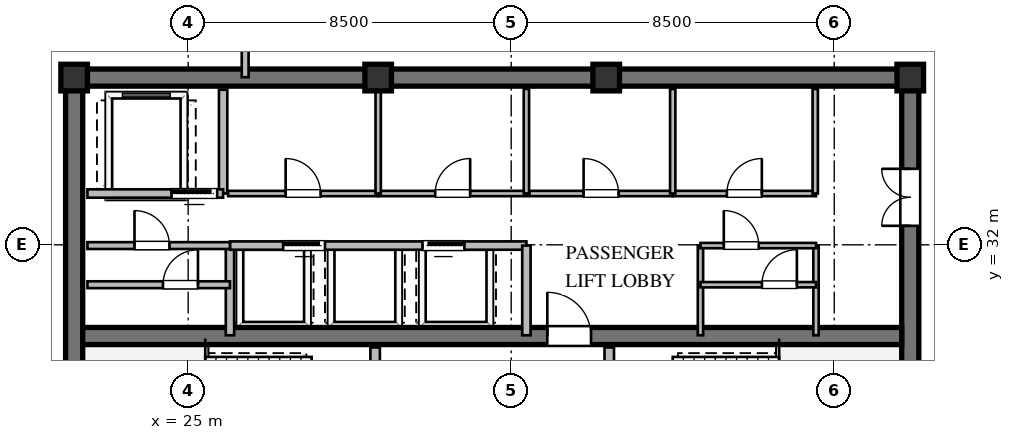
"""IFC4 building model, lengths in metres.
Left out: names, types, materials, properties, quantities, classifications, styles, units other than length and angle.
Written with IfcOpenShell. Run it as: python <this file> out.ifc"""

import sys

from ifc_helpers import new_model, si_unit, direction, frame, frame_2d, origin, origin_2d, place, context, subcontext, project, spatial, rectangle, extrude, element, fill, save


model = new_model("IFC4")
c1 = context("Model", 3, precision=1e-05, world=origin(), true_north=direction((0.0, 1.0)))
c2 = subcontext(c1, "Body", "Model", "MODEL_VIEW")
j1 = project(units=[si_unit("LENGTHUNIT", "METRE"), si_unit("PLANEANGLEUNIT", "RADIAN")], contexts=[c1])
p1 = place(None, origin())
s1 = spatial("IfcSite", under=j1, at=p1, CompositionType="ELEMENT")
p2 = place(p1, origin())
s2 = spatial("IfcBuilding", under=s1, at=p2, CompositionType="ELEMENT")
p3 = place(p2, frame((0.0, 0.0, 289.0)))
s3 = spatial("IfcBuildingStorey", under=s2, at=p3, CompositionType="ELEMENT", Elevation=289.0)
p4 = place(p3, frame((21.775, 36.4, 0.0), z_axis=(0.0, 0.0, 1.0), x_axis=(1.0, 0.0, 0.0)))
e1 = element("IfcWall", 1, at=p4, inside=s3, PredefinedType="SHEAR", context=c2, shape_type="SweptSolid", body=[
    extrude(rectangle(XDim=22.45, YDim=0.45, at=frame_2d((11.225, 0.0))), origin(), (0.0, 0.0, 1.0), 3.48),
])
p5 = place(p3, frame((22.0, 23.825, 0.0), z_axis=(0.0, 0.0, 1.0), x_axis=(0.0, 1.0, 0.0)))
e2 = element("IfcWall", 2, at=p5, inside=s3, PredefinedType="SHEAR", context=c2, shape_type="SweptSolid", body=[
    extrude(rectangle(XDim=12.35, YDim=0.45, at=frame_2d((6.175, 0.0))), origin(), (0.0, 0.0, 1.0), 3.48),
])
p6 = place(p3, frame((44.0, 23.825, 0.0), z_axis=(0.0, 0.0, 1.0), x_axis=(0.0, 1.0, 0.0)))
e3 = element("IfcWall", 3, at=p6, inside=s3, PredefinedType="SHEAR", context=c2, shape_type="SweptSolid", body=[
    extrude(rectangle(XDim=12.35, YDim=0.45, at=frame_2d((6.175, 0.0))), origin(), (0.0, 0.0, 1.0), 3.48),
])
p7 = place(p6, frame((8.675, 0.0, 0.0)))
e4 = element("IfcOpeningElement", 4, at=p7, cuts=e3, PredefinedType="OPENING", context=c2, shape_type="SweptSolid", body=[
    extrude(rectangle(XDim=1.5, YDim=2.15, at=frame_2d((0.75, 1.075))), frame((0.0, 0.235, 0.0), z_axis=(0.0, -1.0, 0.0), x_axis=(1.0, 0.0, 0.0)), (0.0, 0.0, 1.0), 0.47),
])
p8 = place(p3, frame((22.225, 29.6, 0.0), z_axis=(0.0, 0.0, 1.0), x_axis=(1.0, 0.0, 0.0)))
e5 = element("IfcWall", 5, at=p8, inside=s3, PredefinedType="SHEAR", context=c2, shape_type="SweptSolid", body=[
    extrude(rectangle(XDim=21.55, YDim=0.45, at=frame_2d((10.775, 0.0))), origin(), (0.0, 0.0, 1.0), 3.48),
])
p9 = place(p8, frame((12.225, 0.0, 0.0)))
e6 = element("IfcOpeningElement", 6, at=p9, cuts=e5, PredefinedType="OPENING", context=c2, shape_type="SweptSolid", body=[
    extrude(rectangle(XDim=1.15, YDim=2.1, at=frame_2d((0.575, 1.05))), frame((0.0, 0.235, 0.0), z_axis=(0.0, -1.0, 0.0), x_axis=(1.0, 0.0, 0.0)), (0.0, 0.0, 1.0), 0.47),
])
for number, where, z_axis, x_axis in (
    (7, (44.0, 36.4, 0.0), (0.0, 0.0, 1.0), (1.0, 0.0, 0.0)),
    (8, (36.0, 36.4, 0.0), (0.0, 0.0, 1.0), (1.0, 0.0, 0.0)),
    (9, (30.0, 36.4, 0.0), (0.0, 0.0, 1.0), (1.0, 0.0, 0.0)),
    (10, (22.0, 36.4, 0.0), (0.0, 0.0, 1.0), (1.0, 0.0, 0.0)),
):
    element("IfcColumn", number, at=place(p3, frame(where, z_axis=z_axis, x_axis=x_axis)), inside=s3, PredefinedType="COLUMN", context=c2, shape_type="SweptSolid", body=[
        extrude(rectangle(XDim=0.7, YDim=0.7, at=origin_2d()), origin(), (0.0, 0.0, 1.0), 3.8),
    ])
p10 = place(p3, frame((29.92, 23.9, 0.0), z_axis=(0.0, 0.0, 1.0), x_axis=(0.0, 1.0, 0.0)))
e11 = element("IfcWall", 11, at=p10, inside=s3, PredefinedType="SOLIDWALL", context=c2, shape_type="SweptSolid", body=[
    extrude(rectangle(XDim=5.4, YDim=0.25, at=frame_2d((2.7, 0.0))), origin(), (0.0, 0.0, 1.0), 2.47),
])
p11 = place(p10, frame((3.421, 0.0, 0.0)))
e12 = element("IfcOpeningElement", 12, at=p11, cuts=e11, PredefinedType="OPENING", context=c2, shape_type="SweptSolid", body=[
    extrude(rectangle(XDim=1.15, YDim=2.1, at=frame_2d((0.575, 1.05))), frame((0.0, 0.135, 0.0), z_axis=(0.0, -1.0, 0.0), x_axis=(1.0, 0.0, 0.0)), (0.0, 0.0, 1.0), 0.27),
])
p12 = place(p3, frame((36.08, 23.9, 0.0), z_axis=(0.0, 0.0, 1.0), x_axis=(0.0, 1.0, 0.0)))
e13 = element("IfcWall", 13, at=p12, inside=s3, PredefinedType="SOLIDWALL", context=c2, shape_type="SweptSolid", body=[
    extrude(rectangle(XDim=5.4, YDim=0.25, at=frame_2d((2.7, 0.0))), origin(), (0.0, 0.0, 1.0), 3.48),
])
p13 = place(p12, frame((3.421, 0.0, 0.0)))
e14 = element("IfcOpeningElement", 14, at=p13, cuts=e13, PredefinedType="OPENING", context=c2, shape_type="SweptSolid", body=[
    extrude(rectangle(XDim=1.15, YDim=2.1, at=frame_2d((0.575, 1.05))), frame((0.0, 0.135, 0.0), z_axis=(0.0, -1.0, 0.0), x_axis=(1.0, 0.0, 0.0)), (0.0, 0.0, 1.0), 0.27),
])
p14 = place(p3, frame((25.92, 33.35, 0.0), z_axis=(0.0, 0.0, 1.0), x_axis=(0.0, 1.0, 0.0)))
e15 = element("IfcWall", 15, at=p14, inside=s3, PredefinedType="SOLIDWALL", context=c2, shape_type="SweptSolid", body=[
    extrude(rectangle(XDim=2.73, YDim=0.22, at=frame_2d((1.365, 0.0))), origin(), (0.0, 0.0, 1.0), 3.48),
])
p15 = place(p3, frame((22.35, 33.35, 0.0), z_axis=(0.0, 0.0, 1.0), x_axis=(1.0, 0.0, 0.0)))
e16 = element("IfcWall", 16, at=p15, inside=s3, PredefinedType="SOLIDWALL", context=c2, shape_type="SweptSolid", body=[
    extrude(rectangle(XDim=3.57, YDim=0.22, at=frame_2d((1.785, 0.0))), origin(), (0.0, 0.0, 1.0), 3.48),
])
p16 = place(p15, frame((2.213, 0.0, 0.0)))
e17 = element("IfcOpeningElement", 17, at=p16, cuts=e16, PredefinedType="OPENING", context=c2, shape_type="SweptSolid", body=[
    extrude(rectangle(XDim=1.2, YDim=2.1, at=frame_2d((0.6, 1.05))), frame((0.0, 0.12, 0.0), z_axis=(0.0, -1.0, 0.0), x_axis=(1.0, 0.0, 0.0)), (0.0, 0.0, 1.0), 0.24),
])
p17 = place(p3, frame((26.1, 29.62, 0.0), z_axis=(0.0, 0.0, 1.0), x_axis=(0.0, 1.0, 0.0)))
e18 = element("IfcWall", 18, at=p17, inside=s3, PredefinedType="SOLIDWALL", context=c2, shape_type="SweptSolid", body=[
    extrude(rectangle(XDim=2.36, YDim=0.22, at=frame_2d((1.18, 0.0))), origin(), (0.0, 0.0, 1.0), 3.48),
])
p18 = place(p3, frame((26.1, 31.98, 0.0), z_axis=(0.0, 0.0, 1.0), x_axis=(1.0, 0.0, 0.0)))
e19 = element("IfcWall", 19, at=p18, inside=s3, PredefinedType="SOLIDWALL", context=c2, shape_type="SweptSolid", body=[
    extrude(rectangle(XDim=7.8, YDim=0.22, at=frame_2d((3.9, 0.0))), origin(), (0.0, 0.0, 1.0), 3.48),
])
p19 = place(p18, frame((1.4, 0.0, 0.0)))
e20 = element("IfcOpeningElement", 20, at=p19, cuts=e19, PredefinedType="OPENING", context=c2, shape_type="SweptSolid", body=[
    extrude(rectangle(XDim=1.1, YDim=2.1, at=frame_2d((0.55, 1.05))), frame((0.0, 0.12, 0.0), z_axis=(0.0, -1.0, 0.0), x_axis=(1.0, 0.0, 0.0)), (0.0, 0.0, 1.0), 0.24),
])
p20 = place(p18, frame((5.066, 0.0, 0.0)))
e21 = element("IfcOpeningElement", 21, at=p20, cuts=e19, PredefinedType="OPENING", context=c2, shape_type="SweptSolid", body=[
    extrude(rectangle(XDim=1.1, YDim=2.1, at=frame_2d((0.55, 1.05))), frame((0.0, 0.12, 0.0), z_axis=(0.0, -1.0, 0.0), x_axis=(1.0, 0.0, 0.0)), (0.0, 0.0, 1.0), 0.24),
])
p21 = place(p3, frame((33.9, 29.62, 0.0), z_axis=(0.0, 0.0, 1.0), x_axis=(0.0, 1.0, 0.0)))
e22 = element("IfcWall", 22, at=p21, inside=s3, PredefinedType="SOLIDWALL", context=c2, shape_type="SweptSolid", body=[
    extrude(rectangle(XDim=2.36, YDim=0.22, at=frame_2d((1.18, 0.0))), origin(), (0.0, 0.0, 1.0), 3.48),
])
p22 = place(p3, frame((26.05, 33.35, 0.0), z_axis=(0.0, 0.0, 1.0), x_axis=(1.0, 0.0, 0.0)))
e23 = element("IfcWall", 23, at=p22, inside=s3, PredefinedType="PARTITIONING", context=c2, shape_type="SweptSolid", body=[
    extrude(rectangle(XDim=3.95, YDim=0.14, at=frame_2d((1.975, 0.0))), origin(), (0.0, 0.0, 1.0), 3.48),
])
p23 = place(p22, frame((1.515, 0.0, 0.0)))
e24 = element("IfcOpeningElement", 24, at=p23, cuts=e23, PredefinedType="OPENING", context=c2, shape_type="SweptSolid", body=[
    extrude(rectangle(XDim=0.92, YDim=2.1, at=frame_2d((0.46, 1.05))), frame((0.0, 0.08, 0.0), z_axis=(0.0, -1.0, 0.0), x_axis=(1.0, 0.0, 0.0)), (0.0, 0.0, 1.0), 0.16),
])
p24 = place(p3, frame((30.0, 33.35, 0.0), z_axis=(0.0, 0.0, 1.0), x_axis=(1.0, 0.0, 0.0)))
e25 = element("IfcWall", 25, at=p24, inside=s3, PredefinedType="PARTITIONING", context=c2, shape_type="SweptSolid", body=[
    extrude(rectangle(XDim=3.92, YDim=0.14, at=frame_2d((1.96, 0.0))), origin(), (0.0, 0.0, 1.0), 3.48),
])
p25 = place(p24, frame((1.5, 0.0, 0.0)))
e26 = element("IfcOpeningElement", 26, at=p25, cuts=e25, PredefinedType="OPENING", context=c2, shape_type="SweptSolid", body=[
    extrude(rectangle(XDim=0.92, YDim=2.1, at=frame_2d((0.46, 1.05))), frame((0.0, 0.08, 0.0), z_axis=(0.0, -1.0, 0.0), x_axis=(1.0, 0.0, 0.0)), (0.0, 0.0, 1.0), 0.16),
])
for number, where, z_axis, x_axis in (
    (27, (30.0, 33.35, 0.0), (0.0, 0.0, 1.0), (0.0, 1.0, 0.0)),
    (28, (33.9, 33.35, 0.0), (0.0, 0.0, 1.0), (0.0, 1.0, 0.0)),
):
    element("IfcWall", number, at=place(p3, frame(where, z_axis=z_axis, x_axis=x_axis)), inside=s3, PredefinedType="PARTITIONING", context=c2, shape_type="SweptSolid", body=[
        extrude(rectangle(XDim=2.75, YDim=0.14, at=frame_2d((1.375, 0.0))), origin(), (0.0, 0.0, 1.0), 3.48),
    ])
p26 = place(p3, frame((33.98, 33.35, 0.0), z_axis=(0.0, 0.0, 1.0), x_axis=(1.0, 0.0, 0.0)))
e29 = element("IfcWall", 29, at=p26, inside=s3, PredefinedType="PARTITIONING", context=c2, shape_type="SweptSolid", body=[
    extrude(rectangle(XDim=3.77, YDim=0.14, at=frame_2d((1.885, 0.0))), origin(), (0.0, 0.0, 1.0), 3.48),
])
p27 = place(p26, frame((1.425, 0.0, 0.0)))
e30 = element("IfcOpeningElement", 30, at=p27, cuts=e29, PredefinedType="OPENING", context=c2, shape_type="SweptSolid", body=[
    extrude(rectangle(XDim=0.92, YDim=2.1, at=frame_2d((0.46, 1.05))), frame((0.0, 0.08, 0.0), z_axis=(0.0, -1.0, 0.0), x_axis=(1.0, 0.0, 0.0)), (0.0, 0.0, 1.0), 0.16),
])
p28 = place(p3, frame((37.75, 33.35, 0.0), z_axis=(0.0, 0.0, 1.0), x_axis=(1.0, 0.0, 0.0)))
e31 = element("IfcWall", 31, at=p28, inside=s3, PredefinedType="PARTITIONING", context=c2, shape_type="SweptSolid", body=[
    extrude(rectangle(XDim=3.77, YDim=0.14, at=frame_2d((1.885, 0.0))), origin(), (0.0, 0.0, 1.0), 3.48),
])
p29 = place(p28, frame((1.425, 0.0, 0.0)))
e32 = element("IfcOpeningElement", 32, at=p29, cuts=e31, PredefinedType="OPENING", context=c2, shape_type="SweptSolid", body=[
    extrude(rectangle(XDim=0.92, YDim=2.1, at=frame_2d((0.46, 1.05))), frame((0.0, 0.08, 0.0), z_axis=(0.0, -1.0, 0.0), x_axis=(1.0, 0.0, 0.0)), (0.0, 0.0, 1.0), 0.16),
])
for number, where, z_axis, x_axis in (
    (33, (37.75, 33.35, 0.0), (0.0, 0.0, 1.0), (0.0, 1.0, 0.0)),
    (34, (41.5, 33.35, 0.0), (0.0, 0.0, 1.0), (0.0, 1.0, 0.0)),
):
    element("IfcWall", number, at=place(p3, frame(where, z_axis=z_axis, x_axis=x_axis)), inside=s3, PredefinedType="PARTITIONING", context=c2, shape_type="SweptSolid", body=[
        extrude(rectangle(XDim=2.75, YDim=0.14, at=frame_2d((1.375, 0.0))), origin(), (0.0, 0.0, 1.0), 3.48),
    ])
p30 = place(p3, frame((22.35, 30.95, 0.0), z_axis=(0.0, 0.0, 1.0), x_axis=(1.0, 0.0, 0.0)))
e35 = element("IfcWall", 35, at=p30, inside=s3, PredefinedType="PARTITIONING", context=c2, shape_type="SweptSolid", body=[
    extrude(rectangle(XDim=3.75, YDim=0.18, at=frame_2d((1.875, 0.0))), origin(), (0.0, 0.0, 1.0), 3.48),
])
p31 = place(p30, frame((1.988, 0.0, 0.0)))
e36 = element("IfcOpeningElement", 36, at=p31, cuts=e35, PredefinedType="OPENING", context=c2, shape_type="SweptSolid", body=[
    extrude(rectangle(XDim=0.92, YDim=2.1, at=frame_2d((0.46, 1.05))), frame((0.0, 0.1, 0.0), z_axis=(0.0, -1.0, 0.0), x_axis=(1.0, 0.0, 0.0)), (0.0, 0.0, 1.0), 0.2),
])
p32 = place(p3, frame((22.35, 31.98, 0.0), z_axis=(0.0, 0.0, 1.0), x_axis=(1.0, 0.0, 0.0)))
e37 = element("IfcWall", 37, at=p32, inside=s3, PredefinedType="PARTITIONING", context=c2, shape_type="SweptSolid", body=[
    extrude(rectangle(XDim=3.75, YDim=0.18, at=frame_2d((1.875, 0.0))), origin(), (0.0, 0.0, 1.0), 3.48),
])
p33 = place(p32, frame((1.238, 0.0, 0.0)))
e38 = element("IfcOpeningElement", 38, at=p33, cuts=e37, PredefinedType="OPENING", context=c2, shape_type="SweptSolid", body=[
    extrude(rectangle(XDim=0.92, YDim=2.1, at=frame_2d((0.46, 1.05))), frame((0.0, 0.1, 0.0), z_axis=(0.0, -1.0, 0.0), x_axis=(1.0, 0.0, 0.0)), (0.0, 0.0, 1.0), 0.2),
])
for number, where, z_axis, x_axis in (
    (39, (38.48, 29.62, 0.0), (0.0, 0.0, 1.0), (0.0, 1.0, 0.0)),
    (40, (41.52, 29.62, 0.0), (0.0, 0.0, 1.0), (0.0, 1.0, 0.0)),
):
    element("IfcWall", number, at=place(p3, frame(where, z_axis=z_axis, x_axis=x_axis)), inside=s3, PredefinedType="PARTITIONING", context=c2, shape_type="SweptSolid", body=[
        extrude(rectangle(XDim=2.36, YDim=0.14, at=frame_2d((1.18, 0.0))), origin(), (0.0, 0.0, 1.0), 3.48),
    ])
p34 = place(p3, frame((38.48, 30.95, 0.0), z_axis=(0.0, 0.0, 1.0), x_axis=(1.0, 0.0, 0.0)))
e41 = element("IfcWall", 41, at=p34, inside=s3, PredefinedType="PARTITIONING", context=c2, shape_type="SweptSolid", body=[
    extrude(rectangle(XDim=3.04, YDim=0.14, at=frame_2d((1.52, 0.0))), origin(), (0.0, 0.0, 1.0), 3.48),
])
p35 = place(p34, frame((1.617, 0.0, 0.0)))
e42 = element("IfcOpeningElement", 42, at=p35, cuts=e41, PredefinedType="OPENING", context=c2, shape_type="SweptSolid", body=[
    extrude(rectangle(XDim=0.92, YDim=2.1, at=frame_2d((0.46, 1.05))), frame((0.0, 0.08, 0.0), z_axis=(0.0, -1.0, 0.0), x_axis=(1.0, 0.0, 0.0)), (0.0, 0.0, 1.0), 0.16),
])
p36 = place(p3, frame((38.48, 31.98, 0.0), z_axis=(0.0, 0.0, 1.0), x_axis=(1.0, 0.0, 0.0)))
e43 = element("IfcWall", 43, at=p36, inside=s3, PredefinedType="PARTITIONING", context=c2, shape_type="SweptSolid", body=[
    extrude(rectangle(XDim=3.04, YDim=0.14, at=frame_2d((1.52, 0.0))), origin(), (0.0, 0.0, 1.0), 3.48),
])
p37 = place(p36, frame((0.614, 0.0, 0.0)))
e44 = element("IfcOpeningElement", 44, at=p37, cuts=e43, PredefinedType="OPENING", context=c2, shape_type="SweptSolid", body=[
    extrude(rectangle(XDim=0.92, YDim=2.1, at=frame_2d((0.46, 1.05))), frame((0.0, 0.08, 0.0), z_axis=(0.0, -1.0, 0.0), x_axis=(1.0, 0.0, 0.0)), (0.0, 0.0, 1.0), 0.16),
])
p38 = place(p3, frame((26.5, 36.41, 0.0), z_axis=(0.0, 0.0, 1.0), x_axis=(0.0, 1.0, 0.0)))
e45 = element("IfcWall", 45, at=p38, inside=s3, PredefinedType="PARTITIONING", context=c2, shape_type="SweptSolid", body=[
    extrude(rectangle(XDim=15.12, YDim=0.18, at=frame_2d((7.56, 0.0))), origin(), (0.0, 0.0, 1.0), 3.48),
])
p39 = place(p38, frame((8.178, 0.0, 0.0)))
e46 = element("IfcOpeningElement", 46, at=p39, cuts=e45, PredefinedType="OPENING", context=c2, shape_type="SweptSolid", body=[
    extrude(rectangle(XDim=1.1, YDim=2.1, at=frame_2d((0.55, 1.05))), frame((0.0, 0.1, 0.0), z_axis=(0.0, -1.0, 0.0), x_axis=(1.0, 0.0, 0.0)), (0.0, 0.0, 1.0), 0.2),
])
p40 = place(p9, origin())
e47 = element("IfcDoor", 47, at=p40, inside=s3, OperationType="SINGLE_SWING_LEFT", PredefinedType="DOOR", context=c2, shape_type="SweptSolid", body=[
    extrude(rectangle(XDim=1.15, YDim=2.1, at=frame_2d((0.575, 1.05))), frame((0.0, 0.025, 0.0), z_axis=(0.0, -1.0, 0.0), x_axis=(1.0, 0.0, 0.0)), (0.0, 0.0, 1.0), 0.05),
])
fill(e6, e47)
p41 = place(p7, origin())
e48 = element("IfcDoor", 48, at=p41, inside=s3, OperationType="DOUBLE_DOOR_SINGLE_SWING", PredefinedType="DOOR", context=c2, shape_type="SweptSolid", body=[
    extrude(rectangle(XDim=1.5, YDim=2.15, at=frame_2d((0.75, 1.075))), frame((0.0, 0.025, 0.0), z_axis=(0.0, -1.0, 0.0), x_axis=(1.0, 0.0, 0.0)), (0.0, 0.0, 1.0), 0.05),
])
fill(e4, e48)
p42 = place(p16, origin())
e49 = element("IfcDoor", 49, at=p42, inside=s3, OperationType="SLIDING_TO_LEFT", PredefinedType="DOOR", context=c2, shape_type="SweptSolid", body=[
    extrude(rectangle(XDim=1.2, YDim=2.1, at=frame_2d((0.6, 1.05))), frame((0.0, 0.025, 0.0), z_axis=(0.0, -1.0, 0.0), x_axis=(1.0, 0.0, 0.0)), (0.0, 0.0, 1.0), 0.05),
])
fill(e17, e49)
p43 = place(p19, origin())
e50 = element("IfcDoor", 50, at=p43, inside=s3, OperationType="SLIDING_TO_LEFT", PredefinedType="DOOR", context=c2, shape_type="SweptSolid", body=[
    extrude(rectangle(XDim=1.1, YDim=2.1, at=frame_2d((0.55, 1.05))), frame((0.0, 0.025, 0.0), z_axis=(0.0, -1.0, 0.0), x_axis=(1.0, 0.0, 0.0)), (0.0, 0.0, 1.0), 0.05),
])
fill(e20, e50)
p44 = place(p20, origin())
e51 = element("IfcDoor", 51, at=p44, inside=s3, OperationType="SLIDING_TO_RIGHT", PredefinedType="DOOR", context=c2, shape_type="SweptSolid", body=[
    extrude(rectangle(XDim=1.1, YDim=2.1, at=frame_2d((0.55, 1.05))), frame((0.0, 0.025, 0.0), z_axis=(0.0, -1.0, 0.0), x_axis=(1.0, 0.0, 0.0)), (0.0, 0.0, 1.0), 0.05),
])
fill(e21, e51)
p45 = place(p23, origin())
e52 = element("IfcDoor", 52, at=p45, inside=s3, OperationType="SINGLE_SWING_LEFT", PredefinedType="DOOR", context=c2, shape_type="SweptSolid", body=[
    extrude(rectangle(XDim=0.92, YDim=2.1, at=frame_2d((0.46, 1.05))), frame((0.0, 0.025, 0.0), z_axis=(0.0, -1.0, 0.0), x_axis=(1.0, 0.0, 0.0)), (0.0, 0.0, 1.0), 0.05),
])
fill(e24, e52)
p46 = place(p25, origin())
e53 = element("IfcDoor", 53, at=p46, inside=s3, OperationType="SINGLE_SWING_RIGHT", PredefinedType="DOOR", context=c2, shape_type="SweptSolid", body=[
    extrude(rectangle(XDim=0.92, YDim=2.1, at=frame_2d((0.46, 1.05))), frame((0.0, 0.025, 0.0), z_axis=(0.0, -1.0, 0.0), x_axis=(1.0, 0.0, 0.0)), (0.0, 0.0, 1.0), 0.05),
])
fill(e26, e53)
p47 = place(p27, origin())
e54 = element("IfcDoor", 54, at=p47, inside=s3, OperationType="SINGLE_SWING_LEFT", PredefinedType="DOOR", context=c2, shape_type="SweptSolid", body=[
    extrude(rectangle(XDim=0.92, YDim=2.1, at=frame_2d((0.46, 1.05))), frame((0.0, 0.025, 0.0), z_axis=(0.0, -1.0, 0.0), x_axis=(1.0, 0.0, 0.0)), (0.0, 0.0, 1.0), 0.05),
])
fill(e30, e54)
p48 = place(p29, origin())
e55 = element("IfcDoor", 55, at=p48, inside=s3, OperationType="SINGLE_SWING_RIGHT", PredefinedType="DOOR", context=c2, shape_type="SweptSolid", body=[
    extrude(rectangle(XDim=0.92, YDim=2.1, at=frame_2d((0.46, 1.05))), frame((0.0, 0.025, 0.0), z_axis=(0.0, -1.0, 0.0), x_axis=(1.0, 0.0, 0.0)), (0.0, 0.0, 1.0), 0.05),
])
fill(e32, e55)
p49 = place(p33, origin())
e56 = element("IfcDoor", 56, at=p49, inside=s3, OperationType="SINGLE_SWING_LEFT", PredefinedType="DOOR", context=c2, shape_type="SweptSolid", body=[
    extrude(rectangle(XDim=0.92, YDim=2.1, at=frame_2d((0.46, 1.05))), frame((0.0, 0.025, 0.0), z_axis=(0.0, -1.0, 0.0), x_axis=(1.0, 0.0, 0.0)), (0.0, 0.0, 1.0), 0.05),
])
fill(e38, e56)
p50 = place(p31, origin())
e57 = element("IfcDoor", 57, at=p50, inside=s3, OperationType="SINGLE_SWING_RIGHT", PredefinedType="DOOR", context=c2, shape_type="SweptSolid", body=[
    extrude(rectangle(XDim=0.92, YDim=2.1, at=frame_2d((0.46, 1.05))), frame((0.0, 0.025, 0.0), z_axis=(0.0, -1.0, 0.0), x_axis=(1.0, 0.0, 0.0)), (0.0, 0.0, 1.0), 0.05),
])
fill(e36, e57)
p51 = place(p37, origin())
e58 = element("IfcDoor", 58, at=p51, inside=s3, OperationType="SINGLE_SWING_LEFT", PredefinedType="DOOR", context=c2, shape_type="SweptSolid", body=[
    extrude(rectangle(XDim=0.92, YDim=2.1, at=frame_2d((0.46, 1.05))), frame((0.0, 0.025, 0.0), z_axis=(0.0, -1.0, 0.0), x_axis=(1.0, 0.0, 0.0)), (0.0, 0.0, 1.0), 0.05),
])
fill(e44, e58)
p52 = place(p35, origin())
e59 = element("IfcDoor", 59, at=p52, inside=s3, OperationType="SINGLE_SWING_RIGHT", PredefinedType="DOOR", context=c2, shape_type="SweptSolid", body=[
    extrude(rectangle(XDim=0.92, YDim=2.1, at=frame_2d((0.46, 1.05))), frame((0.0, 0.025, 0.0), z_axis=(0.0, -1.0, 0.0), x_axis=(1.0, 0.0, 0.0)), (0.0, 0.0, 1.0), 0.05),
])
fill(e42, e59)
save(model, sys.argv[1])
